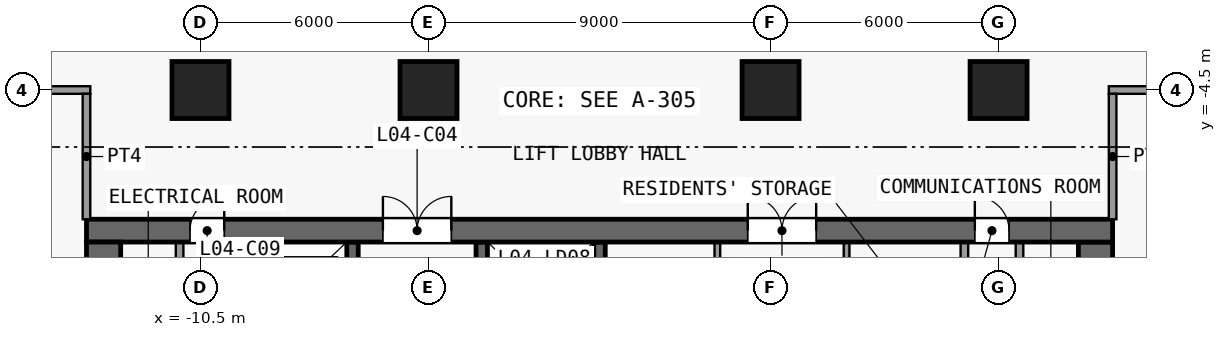
"""IFC4 building model, lengths in metres.
Left out: names, types, materials, properties, quantities, classifications, styles, units other than length and angle.
Written with IfcOpenShell. Run it as: python <this file> out.ifc"""

import sys

from ifc_helpers import new_model, si_unit, direction, frame, frame_2d, origin, origin_2d, place, context, subcontext, project, spatial, rectangle, extrude, element, fill, save


model = new_model("IFC4")
c1 = context("Model", 3, precision=1e-05, world=origin(), true_north=direction((0.0, 1.0)))
c2 = subcontext(c1, "Body", "Model", "MODEL_VIEW")
j1 = project(units=[si_unit("LENGTHUNIT", "METRE"), si_unit("PLANEANGLEUNIT", "RADIAN")], contexts=[c1])
p1 = place(None, origin())
s1 = spatial("IfcSite", under=j1, at=p1, CompositionType="ELEMENT")
p2 = place(p1, origin())
s2 = spatial("IfcBuilding", under=s1, at=p2, CompositionType="ELEMENT")
p3 = place(p2, frame((0.0, 0.0, 23.5)))
s3 = spatial("IfcBuildingStorey", under=s2, at=p3, CompositionType="ELEMENT", Elevation=23.5)
for number, where, z_axis, x_axis in (
    (1, (-10.5, -4.5, 0.0), (0.0, 0.0, 1.0), (1.0, 0.0, 0.0)),
    (2, (-4.5, -4.5, 0.0), (0.0, 0.0, 1.0), (1.0, 0.0, 0.0)),
    (3, (4.5, -4.5, 0.0), (0.0, 0.0, 1.0), (1.0, 0.0, 0.0)),
    (4, (10.5, -4.5, 0.0), (0.0, 0.0, 1.0), (1.0, 0.0, 0.0)),
):
    element("IfcColumn", number, at=place(p3, frame(where, z_axis=z_axis, x_axis=x_axis)), inside=s3, PredefinedType="COLUMN", context=c2, shape_type="SweptSolid", body=[
        extrude(rectangle(XDim=1.5, YDim=1.5, at=origin_2d()), origin(), (0.0, 0.0, 1.0), 4.5),
    ])
p4 = place(p3, frame((-13.5, -8.2, 0.0), z_axis=(0.0, 0.0, 1.0), x_axis=(1.0, 0.0, 0.0)))
e5 = element("IfcWall", 5, at=p4, inside=s3, PredefinedType="SHEAR", context=c2, shape_type="SweptSolid", body=[
    extrude(rectangle(XDim=27.0, YDim=0.6, at=frame_2d((13.5, 0.0))), origin(), (0.0, 0.0, 1.0), 4.15),
])
p5 = place(p4, frame((7.8, 0.0, 0.0)))
e6 = element("IfcOpeningElement", 6, at=p5, cuts=e5, PredefinedType="OPENING", context=c2, shape_type="SweptSolid", body=[
    extrude(rectangle(XDim=1.8, YDim=2.1, at=frame_2d((0.9, 1.05))), frame((0.0, 0.31, 0.0), z_axis=(0.0, -1.0, 0.0), x_axis=(1.0, 0.0, 0.0)), (0.0, 0.0, 1.0), 0.62),
])
p6 = place(p4, frame((17.4, 0.0, 0.0)))
e7 = element("IfcOpeningElement", 7, at=p6, cuts=e5, PredefinedType="OPENING", context=c2, shape_type="SweptSolid", body=[
    extrude(rectangle(XDim=1.8, YDim=2.1, at=frame_2d((0.9, 1.05))), frame((0.0, 0.31, 0.0), z_axis=(0.0, -1.0, 0.0), x_axis=(1.0, 0.0, 0.0)), (0.0, 0.0, 1.0), 0.62),
])
p7 = place(p4, frame((2.725, 0.0, 0.0)))
e8 = element("IfcOpeningElement", 8, at=p7, cuts=e5, PredefinedType="OPENING", context=c2, shape_type="SweptSolid", body=[
    extrude(rectangle(XDim=0.9, YDim=2.1, at=frame_2d((0.45, 1.05))), frame((0.0, 0.31, 0.0), z_axis=(0.0, -1.0, 0.0), x_axis=(1.0, 0.0, 0.0)), (0.0, 0.0, 1.0), 0.62),
])
p8 = place(p4, frame((23.375, 0.0, 0.0)))
e9 = element("IfcOpeningElement", 9, at=p8, cuts=e5, PredefinedType="OPENING", context=c2, shape_type="SweptSolid", body=[
    extrude(rectangle(XDim=0.9, YDim=2.1, at=frame_2d((0.45, 1.05))), frame((0.0, 0.31, 0.0), z_axis=(0.0, -1.0, 0.0), x_axis=(1.0, 0.0, 0.0)), (0.0, 0.0, 1.0), 0.62),
])
p9 = place(p3, frame((-13.05, -8.5, 0.0), z_axis=(0.0, 0.0, 1.0), x_axis=(0.0, -1.0, 0.0)))
e10 = element("IfcWall", 10, at=p9, inside=s3, PredefinedType="SHEAR", context=c2, shape_type="SweptSolid", body=[
    extrude(rectangle(XDim=16.1, YDim=0.9, at=frame_2d((8.05, 0.0))), origin(), (0.0, 0.0, 1.0), 4.15),
])
p10 = place(p9, frame((14.8, 0.0, 0.0)))
e11 = element("IfcOpeningElement", 11, at=p10, cuts=e10, PredefinedType="OPENING", context=c2, shape_type="SweptSolid", body=[
    extrude(rectangle(XDim=1.1, YDim=2.1, at=frame_2d((0.55, 1.05))), frame((0.0, 0.46, 0.0), z_axis=(0.0, -1.0, 0.0), x_axis=(1.0, 0.0, 0.0)), (0.0, 0.0, 1.0), 0.92),
])
p11 = place(p3, frame((13.05, -24.6, 0.0), z_axis=(0.0, 0.0, 1.0), x_axis=(0.0, 1.0, 0.0)))
e12 = element("IfcWall", 12, at=p11, inside=s3, PredefinedType="SHEAR", context=c2, shape_type="SweptSolid", body=[
    extrude(rectangle(XDim=16.1, YDim=0.9, at=frame_2d((8.05, 0.0))), origin(), (0.0, 0.0, 1.0), 4.15),
])
p12 = place(p11, frame((0.2, 0.0, 0.0)))
e13 = element("IfcOpeningElement", 13, at=p12, cuts=e12, PredefinedType="OPENING", context=c2, shape_type="SweptSolid", body=[
    extrude(rectangle(XDim=1.1, YDim=2.1, at=frame_2d((0.55, 1.05))), frame((0.0, 0.46, 0.0), z_axis=(0.0, -1.0, 0.0), x_axis=(1.0, 0.0, 0.0)), (0.0, 0.0, 1.0), 0.92),
])
p13 = place(p3, frame((-11.05, -10.7, 0.0), z_axis=(0.0, 0.0, 1.0), x_axis=(0.0, 1.0, 0.0)))
e14 = element("IfcWall", 14, at=p13, inside=s3, PredefinedType="PARTITIONING", context=c2, shape_type="SweptSolid", body=[
    extrude(rectangle(XDim=2.2, YDim=0.2, at=frame_2d((1.1, 0.0))), origin(), (0.0, 0.0, 1.0), 4.15),
])
p14 = place(p13, frame((0.7, 0.0, 0.0)))
e15 = element("IfcOpeningElement", 15, at=p14, cuts=e14, PredefinedType="OPENING", context=c2, shape_type="SweptSolid", body=[
    extrude(rectangle(XDim=0.9, YDim=2.1, at=frame_2d((0.45, 1.05))), frame((0.0, 0.11, 0.0), z_axis=(0.0, -1.0, 0.0), x_axis=(1.0, 0.0, 0.0)), (0.0, 0.0, 1.0), 0.22),
])
p15 = place(p3, frame((-9.6, -17.2, 0.0), z_axis=(0.0, 0.0, 1.0), x_axis=(0.0, 1.0, 0.0)))
e16 = element("IfcWall", 16, at=p15, inside=s3, PredefinedType="SHEAR", context=c2, shape_type="SweptSolid", body=[
    extrude(rectangle(XDim=8.7, YDim=0.3, at=frame_2d((4.35, 0.0))), origin(), (0.0, 0.0, 1.0), 4.15),
])
p16 = place(p3, frame((-6.5, -22.5, 0.0), z_axis=(0.0, 0.0, 1.0), x_axis=(0.0, 1.0, 0.0)))
e17 = element("IfcWall", 17, at=p16, inside=s3, PredefinedType="SHEAR", context=c2, shape_type="SweptSolid", body=[
    extrude(rectangle(XDim=14.0, YDim=0.3, at=frame_2d((7.0, 0.0))), origin(), (0.0, 0.0, 1.0), 4.15),
])
p17 = place(p16, frame((0.94, 0.0, 0.0)))
e18 = element("IfcOpeningElement", 18, at=p17, cuts=e17, PredefinedType="OPENING", context=c2, shape_type="SweptSolid", body=[
    extrude(rectangle(XDim=1.1, YDim=2.1, at=frame_2d((0.55, 1.05))), frame((0.0, 0.16, 0.0), z_axis=(0.0, -1.0, 0.0), x_axis=(1.0, 0.0, 0.0)), (0.0, 0.0, 1.0), 0.32),
])
p18 = place(p16, frame((3.72, 0.0, 0.0)))
e19 = element("IfcOpeningElement", 19, at=p18, cuts=e17, PredefinedType="OPENING", context=c2, shape_type="SweptSolid", body=[
    extrude(rectangle(XDim=1.1, YDim=2.1, at=frame_2d((0.55, 1.05))), frame((0.0, 0.16, 0.0), z_axis=(0.0, -1.0, 0.0), x_axis=(1.0, 0.0, 0.0)), (0.0, 0.0, 1.0), 0.32),
])
p19 = place(p16, frame((6.5, 0.0, 0.0)))
e20 = element("IfcOpeningElement", 20, at=p19, cuts=e17, PredefinedType="OPENING", context=c2, shape_type="SweptSolid", body=[
    extrude(rectangle(XDim=1.1, YDim=2.1, at=frame_2d((0.55, 1.05))), frame((0.0, 0.16, 0.0), z_axis=(0.0, -1.0, 0.0), x_axis=(1.0, 0.0, 0.0)), (0.0, 0.0, 1.0), 0.32),
])
p20 = place(p16, frame((9.28, 0.0, 0.0)))
e21 = element("IfcOpeningElement", 21, at=p20, cuts=e17, PredefinedType="OPENING", context=c2, shape_type="SweptSolid", body=[
    extrude(rectangle(XDim=1.1, YDim=2.1, at=frame_2d((0.55, 1.05))), frame((0.0, 0.16, 0.0), z_axis=(0.0, -1.0, 0.0), x_axis=(1.0, 0.0, 0.0)), (0.0, 0.0, 1.0), 0.32),
])
p21 = place(p16, frame((12.06, 0.0, 0.0)))
e22 = element("IfcOpeningElement", 22, at=p21, cuts=e17, PredefinedType="OPENING", context=c2, shape_type="SweptSolid", body=[
    extrude(rectangle(XDim=1.1, YDim=2.1, at=frame_2d((0.55, 1.05))), frame((0.0, 0.16, 0.0), z_axis=(0.0, -1.0, 0.0), x_axis=(1.0, 0.0, 0.0)), (0.0, 0.0, 1.0), 0.32),
])
p22 = place(p3, frame((-3.1, -22.55, 0.0), z_axis=(0.0, 0.0, 1.0), x_axis=(0.0, 1.0, 0.0)))
e23 = element("IfcWall", 23, at=p22, inside=s3, PredefinedType="SHEAR", context=c2, shape_type="SweptSolid", body=[
    extrude(rectangle(XDim=14.05, YDim=0.3, at=frame_2d((7.025, 0.0))), origin(), (0.0, 0.0, 1.0), 4.15),
])
p23 = place(p22, frame((12.11, 0.0, 0.0)))
e24 = element("IfcOpeningElement", 24, at=p23, cuts=e23, PredefinedType="OPENING", context=c2, shape_type="SweptSolid", body=[
    extrude(rectangle(XDim=1.1, YDim=2.1, at=frame_2d((0.55, 1.05))), frame((0.0, 0.16, 0.0), z_axis=(0.0, -1.0, 0.0), x_axis=(1.0, 0.0, 0.0)), (0.0, 0.0, 1.0), 0.32),
])
p24 = place(p22, frame((0.84, 0.0, 0.0)))
e25 = element("IfcOpeningElement", 25, at=p24, cuts=e23, PredefinedType="OPENING", context=c2, shape_type="SweptSolid", body=[
    extrude(rectangle(XDim=1.4, YDim=2.1, at=frame_2d((0.7, 1.05))), frame((0.0, 0.16, 0.0), z_axis=(0.0, -1.0, 0.0), x_axis=(1.0, 0.0, 0.0)), (0.0, 0.0, 1.0), 0.32),
])
p25 = place(p3, frame((0.0, -22.25, 0.0), z_axis=(0.0, 0.0, 1.0), x_axis=(0.0, 1.0, 0.0)))
e26 = element("IfcWall", 26, at=p25, inside=s3, PredefinedType="SHEAR", context=c2, shape_type="SweptSolid", body=[
    extrude(rectangle(XDim=13.75, YDim=0.3, at=frame_2d((6.875, 0.0))), origin(), (0.0, 0.0, 1.0), 4.15),
])
p26 = place(p3, frame((3.1, -19.4, 0.0), z_axis=(0.0, 0.0, 1.0), x_axis=(0.0, 1.0, 0.0)))
e27 = element("IfcWall", 27, at=p26, inside=s3, PredefinedType="PARTITIONING", context=c2, shape_type="SweptSolid", body=[
    extrude(rectangle(XDim=10.9, YDim=0.15, at=frame_2d((5.45, 0.0))), origin(), (0.0, 0.0, 1.0), 4.15),
])
p27 = place(p26, frame((4.8, 0.0, 0.0)))
e28 = element("IfcOpeningElement", 28, at=p27, cuts=e27, PredefinedType="OPENING", context=c2, shape_type="SweptSolid", body=[
    extrude(rectangle(XDim=1.2, YDim=2.1, at=frame_2d((0.6, 1.05))), frame((0.0, 0.085, 0.0), z_axis=(0.0, -1.0, 0.0), x_axis=(1.0, 0.0, 0.0)), (0.0, 0.0, 1.0), 0.17),
])
p28 = place(p3, frame((6.5, -8.5, 0.0), z_axis=(0.0, 0.0, 1.0), x_axis=(0.0, -1.0, 0.0)))
e29 = element("IfcWall", 29, at=p28, inside=s3, PredefinedType="PARTITIONING", context=c2, shape_type="SweptSolid", body=[
    extrude(rectangle(XDim=10.85, YDim=0.15, at=frame_2d((5.425, 0.0))), origin(), (0.0, 0.0, 1.0), 4.15),
])
p29 = place(p28, frame((6.275, 0.0, 0.0)))
e30 = element("IfcOpeningElement", 30, at=p29, cuts=e29, PredefinedType="OPENING", context=c2, shape_type="SweptSolid", body=[
    extrude(rectangle(XDim=1.2, YDim=2.1, at=frame_2d((0.6, 1.05))), frame((0.0, 0.085, 0.0), z_axis=(0.0, -1.0, 0.0), x_axis=(1.0, 0.0, 0.0)), (0.0, 0.0, 1.0), 0.17),
])
p30 = place(p28, frame((0.925, 0.0, 0.0)))
e31 = element("IfcOpeningElement", 31, at=p30, cuts=e29, PredefinedType="OPENING", context=c2, shape_type="SweptSolid", body=[
    extrude(rectangle(XDim=0.9, YDim=2.1, at=frame_2d((0.45, 1.05))), frame((0.0, 0.085, 0.0), z_axis=(0.0, -1.0, 0.0), x_axis=(1.0, 0.0, 0.0)), (0.0, 0.0, 1.0), 0.17),
])
p31 = place(p3, frame((9.6, -16.9, 0.0), z_axis=(0.0, 0.0, 1.0), x_axis=(0.0, 1.0, 0.0)))
e32 = element("IfcWall", 32, at=p31, inside=s3, PredefinedType="PARTITIONING", context=c2, shape_type="SweptSolid", body=[
    extrude(rectangle(XDim=8.4, YDim=0.2, at=frame_2d((4.2, 0.0))), origin(), (0.0, 0.0, 1.0), 4.15),
])
p32 = place(p3, frame((11.05, -8.5, 0.0), z_axis=(0.0, 0.0, 1.0), x_axis=(0.0, -1.0, 0.0)))
e33 = element("IfcWall", 33, at=p32, inside=s3, PredefinedType="PARTITIONING", context=c2, shape_type="SweptSolid", body=[
    extrude(rectangle(XDim=2.9, YDim=0.2, at=frame_2d((1.45, 0.0))), origin(), (0.0, 0.0, 1.0), 4.15),
])
p33 = place(p32, frame((0.95, 0.0, 0.0)))
e34 = element("IfcOpeningElement", 34, at=p33, cuts=e33, PredefinedType="OPENING", context=c2, shape_type="SweptSolid", body=[
    extrude(rectangle(XDim=0.9, YDim=2.1, at=frame_2d((0.45, 1.05))), frame((0.0, 0.11, 0.0), z_axis=(0.0, -1.0, 0.0), x_axis=(1.0, 0.0, 0.0)), (0.0, 0.0, 1.0), 0.22),
])
p34 = place(p3, frame((-31.6, -4.5, 0.0), z_axis=(0.0, 0.0, 1.0), x_axis=(1.0, 0.0, 0.0)))
e35 = element("IfcWall", 35, at=p34, inside=s3, PredefinedType="PARTITIONING", context=c2, shape_type="SweptSolid", body=[
    extrude(rectangle(XDim=18.2, YDim=0.2, at=frame_2d((9.1, 0.0))), origin(), (0.0, 0.0, 1.0), 4.15),
])
p35 = place(p34, frame((3.2, 0.0, 0.0)))
e36 = element("IfcOpeningElement", 36, at=p35, cuts=e35, PredefinedType="OPENING", context=c2, shape_type="SweptSolid", body=[
    extrude(rectangle(XDim=1.0, YDim=2.1, at=frame_2d((0.5, 1.05))), frame((0.0, 0.11, 0.0), z_axis=(0.0, -1.0, 0.0), x_axis=(1.0, 0.0, 0.0)), (0.0, 0.0, 1.0), 0.22),
])
p36 = place(p34, frame((13.2, 0.0, 0.0)))
e37 = element("IfcOpeningElement", 37, at=p36, cuts=e35, PredefinedType="OPENING", context=c2, shape_type="SweptSolid", body=[
    extrude(rectangle(XDim=1.0, YDim=2.1, at=frame_2d((0.5, 1.05))), frame((0.0, 0.11, 0.0), z_axis=(0.0, -1.0, 0.0), x_axis=(1.0, 0.0, 0.0)), (0.0, 0.0, 1.0), 0.22),
])
p37 = place(p3, frame((13.4, -4.5, 0.0), z_axis=(0.0, 0.0, 1.0), x_axis=(1.0, 0.0, 0.0)))
e38 = element("IfcWall", 38, at=p37, inside=s3, PredefinedType="PARTITIONING", context=c2, shape_type="SweptSolid", body=[
    extrude(rectangle(XDim=15.2, YDim=0.2, at=frame_2d((7.6, 0.0))), origin(), (0.0, 0.0, 1.0), 4.15),
])
p38 = place(p37, frame((4.0, 0.0, 0.0)))
e39 = element("IfcOpeningElement", 39, at=p38, cuts=e38, PredefinedType="OPENING", context=c2, shape_type="SweptSolid", body=[
    extrude(rectangle(XDim=1.8, YDim=2.1, at=frame_2d((0.9, 1.05))), frame((0.0, 0.11, 0.0), z_axis=(0.0, -1.0, 0.0), x_axis=(1.0, 0.0, 0.0)), (0.0, 0.0, 1.0), 0.22),
])
p39 = place(p37, frame((11.2, 0.0, 0.0)))
e40 = element("IfcOpeningElement", 40, at=p39, cuts=e38, PredefinedType="OPENING", context=c2, shape_type="SweptSolid", body=[
    extrude(rectangle(XDim=1.8, YDim=2.1, at=frame_2d((0.9, 1.05))), frame((0.0, 0.11, 0.0), z_axis=(0.0, -1.0, 0.0), x_axis=(1.0, 0.0, 0.0)), (0.0, 0.0, 1.0), 0.22),
])
for number, where, z_axis, x_axis in (
    (41, (-13.5, -7.9, 0.0), (0.0, 0.0, 1.0), (0.0, 1.0, 0.0)),
    (42, (13.5, -7.9, 0.0), (0.0, 0.0, 1.0), (0.0, 1.0, 0.0)),
):
    element("IfcWall", number, at=place(p3, frame(where, z_axis=z_axis, x_axis=x_axis)), inside=s3, PredefinedType="PARTITIONING", context=c2, shape_type="SweptSolid", body=[
        extrude(rectangle(XDim=3.3, YDim=0.2, at=frame_2d((1.65, 0.0))), origin(), (0.0, 0.0, 1.0), 4.15),
    ])
p40 = place(p5, origin())
e43 = element("IfcDoor", 43, at=p40, inside=s3, OperationType="DOUBLE_DOOR_SINGLE_SWING", PredefinedType="DOOR", context=c2, shape_type="SweptSolid", body=[
    extrude(rectangle(XDim=1.8, YDim=2.1, at=frame_2d((0.9, 1.05))), frame((0.0, 0.025, 0.0), z_axis=(0.0, -1.0, 0.0), x_axis=(1.0, 0.0, 0.0)), (0.0, 0.0, 1.0), 0.05),
])
fill(e6, e43)
p41 = place(p6, origin())
e44 = element("IfcDoor", 44, at=p41, inside=s3, OperationType="DOUBLE_DOOR_SINGLE_SWING", PredefinedType="DOOR", context=c2, shape_type="SweptSolid", body=[
    extrude(rectangle(XDim=1.8, YDim=2.1, at=frame_2d((0.9, 1.05))), frame((0.0, 0.025, 0.0), z_axis=(0.0, -1.0, 0.0), x_axis=(1.0, 0.0, 0.0)), (0.0, 0.0, 1.0), 0.05),
])
fill(e7, e44)
p42 = place(p7, origin())
e45 = element("IfcDoor", 45, at=p42, inside=s3, OperationType="SINGLE_SWING_RIGHT", PredefinedType="DOOR", context=c2, shape_type="SweptSolid", body=[
    extrude(rectangle(XDim=0.9, YDim=2.1, at=frame_2d((0.45, 1.05))), frame((0.0, 0.025, 0.0), z_axis=(0.0, -1.0, 0.0), x_axis=(1.0, 0.0, 0.0)), (0.0, 0.0, 1.0), 0.05),
])
fill(e8, e45)
p43 = place(p8, origin())
e46 = element("IfcDoor", 46, at=p43, inside=s3, OperationType="SINGLE_SWING_LEFT", PredefinedType="DOOR", context=c2, shape_type="SweptSolid", body=[
    extrude(rectangle(XDim=0.9, YDim=2.1, at=frame_2d((0.45, 1.05))), frame((0.0, 0.025, 0.0), z_axis=(0.0, -1.0, 0.0), x_axis=(1.0, 0.0, 0.0)), (0.0, 0.0, 1.0), 0.05),
])
fill(e9, e46)
save(model, sys.argv[1])
